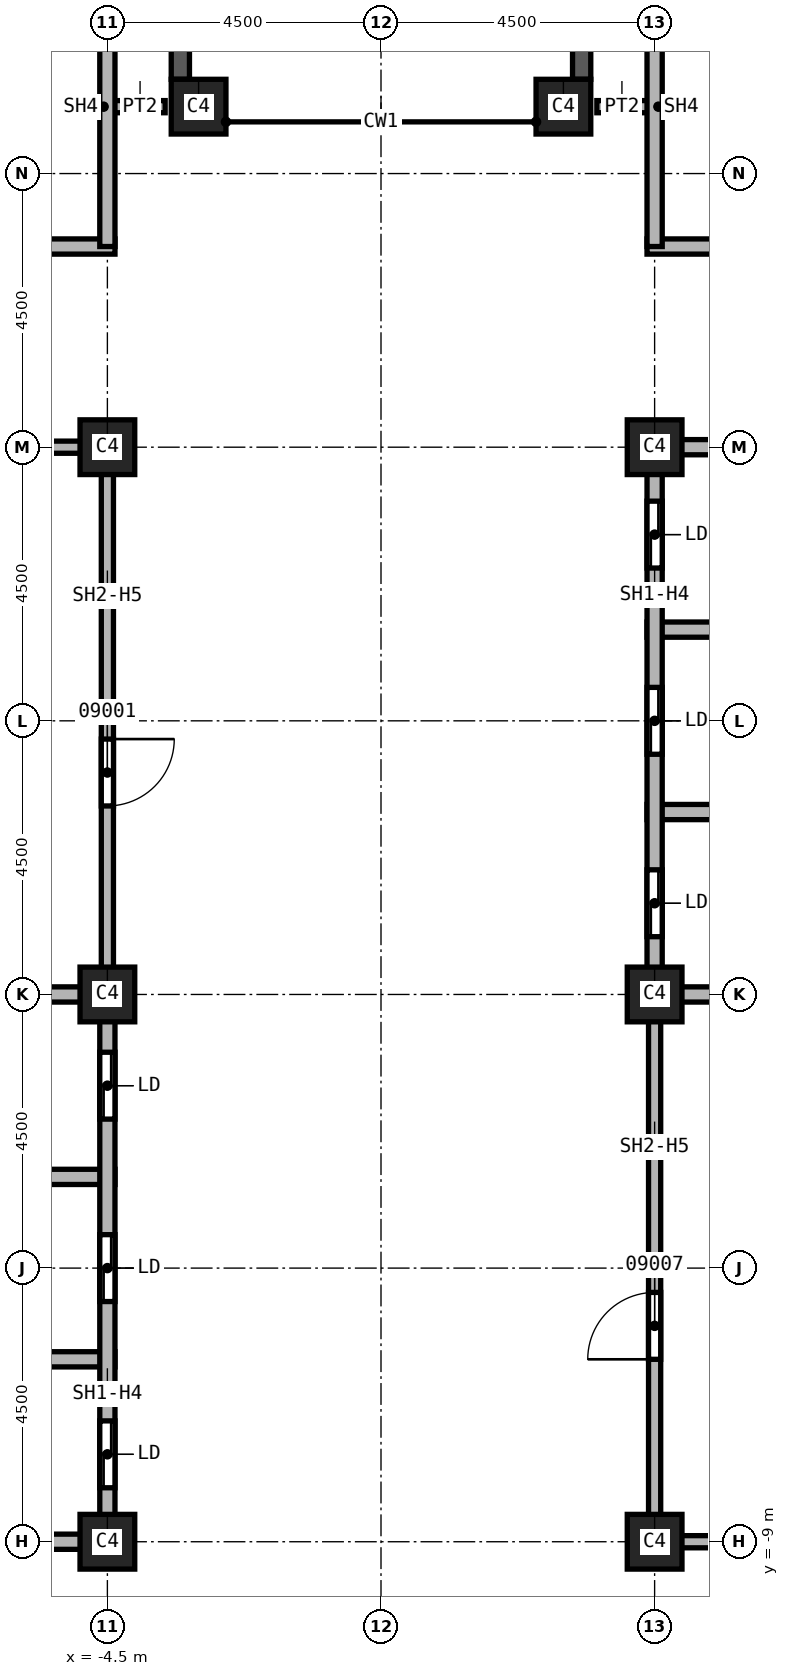
"""IFC4 building model, lengths in metres.
Left out: names, types, materials, properties, quantities, classifications, styles, units other than length and angle.
Written with IfcOpenShell. Run it as: python <this file> out.ifc"""

import sys

from ifc_helpers import new_model, si_unit, direction, frame, frame_2d, origin, origin_2d, place, context, subcontext, project, spatial, rectangle, extrude, element, fill, save


model = new_model("IFC4")
c1 = context("Model", 3, precision=1e-05, world=origin(), true_north=direction((0.0, 1.0)))
c2 = subcontext(c1, "Body", "Model", "MODEL_VIEW")
j1 = project(units=[si_unit("LENGTHUNIT", "METRE"), si_unit("PLANEANGLEUNIT", "RADIAN")], contexts=[c1])
p1 = place(None, origin())
s1 = spatial("IfcSite", under=j1, at=p1, CompositionType="ELEMENT")
p2 = place(p1, origin())
s2 = spatial("IfcBuilding", under=s1, at=p2, CompositionType="ELEMENT")
p3 = place(p2, frame((0.0, 0.0, 166.0)))
s3 = spatial("IfcBuildingStorey", under=s2, at=p3, CompositionType="ELEMENT", Elevation=166.0)
for number, where, z_axis, x_axis in (
    (1, (4.5, 0.0, 0.0), (0.0, 0.0, 1.0), (1.0, 0.0, 0.0)),
    (2, (4.5, 9.0, 0.0), (0.0, 0.0, 1.0), (1.0, 0.0, 0.0)),
    (3, (4.5, -9.0, 0.0), (0.0, 0.0, 1.0), (1.0, 0.0, 0.0)),
    (4, (-4.5, 0.0, 0.0), (0.0, 0.0, 1.0), (1.0, 0.0, 0.0)),
    (5, (-4.5, 9.0, 0.0), (0.0, 0.0, 1.0), (1.0, 0.0, 0.0)),
    (6, (-4.5, -9.0, 0.0), (0.0, 0.0, 1.0), (1.0, 0.0, 0.0)),
    (7, (3.0, 14.6, 0.0), (0.0, 0.0, 1.0), (1.0, 0.0, 0.0)),
    (8, (-3.0, 14.6, 0.0), (0.0, 0.0, 1.0), (1.0, 0.0, 0.0)),
):
    element("IfcColumn", number, at=place(p3, frame(where, z_axis=z_axis, x_axis=x_axis)), inside=s3, PredefinedType="COLUMN", context=c2, shape_type="SweptSolid", body=[
        extrude(rectangle(XDim=0.9, YDim=0.9, at=origin_2d()), origin(), (0.0, 0.0, 1.0), 3.7),
    ])
p4 = place(p3, frame((3.3, 23.05, 0.0), z_axis=(0.0, 0.0, 1.0), x_axis=(0.0, -1.0, 0.0)))
e9 = element("IfcWall", 9, at=p4, inside=s3, PredefinedType="SOLIDWALL", context=c2, shape_type="SweptSolid", body=[
    extrude(rectangle(XDim=8.0, YDim=0.3, at=frame_2d((4.0, 0.0))), origin(), (0.0, 0.0, 1.0), 3.1),
])
p5 = place(p4, frame((0.8, 0.0, 0.8)))
e10 = element("IfcOpeningElement", 10, at=p5, cuts=e9, PredefinedType="OPENING", context=c2, shape_type="SweptSolid", body=[
    extrude(rectangle(XDim=2.4, YDim=1.95, at=frame_2d((1.2, 0.975))), frame((0.0, 0.15, 0.0), z_axis=(0.0, -1.0, 0.0), x_axis=(1.0, 0.0, 0.0)), (0.0, 0.0, 1.0), 0.3),
])
p6 = place(p4, frame((4.8, 0.0, 0.8)))
e11 = element("IfcOpeningElement", 11, at=p6, cuts=e9, PredefinedType="OPENING", context=c2, shape_type="SweptSolid", body=[
    extrude(rectangle(XDim=2.4, YDim=1.95, at=frame_2d((1.2, 0.975))), frame((0.0, 0.15, 0.0), z_axis=(0.0, -1.0, 0.0), x_axis=(1.0, 0.0, 0.0)), (0.0, 0.0, 1.0), 0.3),
])
p7 = place(p3, frame((-3.3, 15.05, 0.0), z_axis=(0.0, 0.0, 1.0), x_axis=(0.0, 1.0, 0.0)))
e12 = element("IfcWall", 12, at=p7, inside=s3, PredefinedType="SOLIDWALL", context=c2, shape_type="SweptSolid", body=[
    extrude(rectangle(XDim=8.0, YDim=0.3, at=frame_2d((4.0, 0.0))), origin(), (0.0, 0.0, 1.0), 3.1),
])
p8 = place(p7, frame((0.8, 0.0, 0.8)))
e13 = element("IfcOpeningElement", 13, at=p8, cuts=e12, PredefinedType="OPENING", context=c2, shape_type="SweptSolid", body=[
    extrude(rectangle(XDim=2.4, YDim=1.95, at=frame_2d((1.2, 0.975))), frame((0.0, 0.15, 0.0), z_axis=(0.0, -1.0, 0.0), x_axis=(1.0, 0.0, 0.0)), (0.0, 0.0, 1.0), 0.3),
])
p9 = place(p7, frame((4.8, 0.0, 0.8)))
e14 = element("IfcOpeningElement", 14, at=p9, cuts=e12, PredefinedType="OPENING", context=c2, shape_type="SweptSolid", body=[
    extrude(rectangle(XDim=2.4, YDim=1.95, at=frame_2d((1.2, 0.975))), frame((0.0, 0.15, 0.0), z_axis=(0.0, -1.0, 0.0), x_axis=(1.0, 0.0, 0.0)), (0.0, 0.0, 1.0), 0.3),
])
for number, where, z_axis, x_axis in (
    (15, (-4.5, 14.6, 0.0), (0.0, 0.0, 1.0), (1.0, 0.0, 0.0)),
    (16, (3.55, 14.6, 0.0), (0.0, 0.0, 1.0), (1.0, 0.0, 0.0)),
):
    element("IfcWall", number, at=place(p3, frame(where, z_axis=z_axis, x_axis=x_axis)), inside=s3, PredefinedType="PARTITIONING", context=c2, shape_type="SweptSolid", body=[
        extrude(rectangle(XDim=0.95, YDim=0.2, at=frame_2d((0.475, 0.0))), origin(), (0.0, 0.0, 1.0), 3.7),
    ])
p10 = place(p3, frame((-7.5, 9.0, 0.0), z_axis=(0.0, 0.0, 1.0), x_axis=(1.0, 0.0, 0.0)))
e17 = element("IfcWall", 17, at=p10, inside=s3, PredefinedType="SOLIDWALL", context=c2, shape_type="SweptSolid", body=[
    extrude(rectangle(XDim=3.0, YDim=0.2, at=frame_2d((1.5, 0.0))), origin(), (0.0, 0.0, 1.0), 2.938),
])
p11 = place(p3, frame((-4.5, 9.1, 0.0), z_axis=(0.0, 0.0, 1.0), x_axis=(0.0, -1.0, 0.0)))
e18 = element("IfcWall", 18, at=p11, inside=s3, PredefinedType="SOLIDWALL", context=c2, shape_type="SweptSolid", body=[
    extrude(rectangle(XDim=9.1, YDim=0.2, at=frame_2d((4.55, 0.0))), origin(), (0.0, 0.0, 1.0), 2.938),
])
p12 = place(p11, frame((4.9, 0.0, 0.0)))
e19 = element("IfcOpeningElement", 19, at=p12, cuts=e18, PredefinedType="OPENING", context=c2, shape_type="SweptSolid", body=[
    extrude(rectangle(XDim=1.1, YDim=2.1, at=frame_2d((0.55, 1.05))), frame((0.0, 0.1, 0.0), z_axis=(0.0, -1.0, 0.0), x_axis=(1.0, 0.0, 0.0)), (0.0, 0.0, 1.0), 0.2),
])
p13 = place(p3, frame((4.5, -9.1, 0.0), z_axis=(0.0, 0.0, 1.0), x_axis=(0.0, 1.0, 0.0)))
e20 = element("IfcWall", 20, at=p13, inside=s3, PredefinedType="SOLIDWALL", context=c2, shape_type="SweptSolid", body=[
    extrude(rectangle(XDim=9.1, YDim=0.2, at=frame_2d((4.55, 0.0))), origin(), (0.0, 0.0, 1.0), 2.938),
])
p14 = place(p13, frame((3.1, 0.0, 0.0)))
e21 = element("IfcOpeningElement", 21, at=p14, cuts=e20, PredefinedType="OPENING", context=c2, shape_type="SweptSolid", body=[
    extrude(rectangle(XDim=1.1, YDim=2.1, at=frame_2d((0.55, 1.05))), frame((0.0, 0.1, 0.0), z_axis=(0.0, -1.0, 0.0), x_axis=(1.0, 0.0, 0.0)), (0.0, 0.0, 1.0), 0.2),
])
p15 = place(p3, frame((7.5, -9.0, 0.0), z_axis=(0.0, 0.0, 1.0), x_axis=(-1.0, 0.0, 0.0)))
e22 = element("IfcWall", 22, at=p15, inside=s3, PredefinedType="SOLIDWALL", context=c2, shape_type="SweptSolid", body=[
    extrude(rectangle(XDim=3.0, YDim=0.2, at=frame_2d((1.5, 0.0))), origin(), (0.0, 0.0, 1.0), 2.938),
])
p16 = place(p3, frame((-13.625, -3.0, 0.0), z_axis=(0.0, 0.0, 1.0), x_axis=(1.0, 0.0, 0.0)))
e23 = element("IfcWall", 23, at=p16, inside=s3, PredefinedType="SOLIDWALL", context=c2, shape_type="SweptSolid", body=[
    extrude(rectangle(XDim=9.25, YDim=0.25, at=frame_2d((4.625, 0.0))), origin(), (0.0, 0.0, 1.0), 3.7),
])
p17 = place(p16, frame((3.25, 0.0, 0.0)))
e24 = element("IfcOpeningElement", 24, at=p17, cuts=e23, PredefinedType="OPENING", context=c2, shape_type="SweptSolid", body=[
    extrude(rectangle(XDim=1.1, YDim=2.1, at=frame_2d((0.55, 1.05))), frame((0.0, 0.125, 0.0), z_axis=(0.0, -1.0, 0.0), x_axis=(1.0, 0.0, 0.0)), (0.0, 0.0, 1.0), 0.25),
])
for number, where, z_axis, x_axis in (
    (25, (-7.625, -6.0, 0.0), (0.0, 0.0, 1.0), (1.0, 0.0, 0.0)),
    (26, (-7.625, 0.0, 0.0), (0.0, 0.0, 1.0), (1.0, 0.0, 0.0)),
):
    element("IfcWall", number, at=place(p3, frame(where, z_axis=z_axis, x_axis=x_axis)), inside=s3, PredefinedType="SOLIDWALL", context=c2, shape_type="SweptSolid", body=[
        extrude(rectangle(XDim=3.25, YDim=0.25, at=frame_2d((1.625, 0.0))), origin(), (0.0, 0.0, 1.0), 3.7),
    ])
p18 = place(p3, frame((-4.5, -9.0, 0.0), z_axis=(0.0, 0.0, 1.0), x_axis=(-1.0, 0.0, 0.0)))
e27 = element("IfcWall", 27, at=p18, inside=s3, PredefinedType="SOLIDWALL", context=c2, shape_type="SweptSolid", body=[
    extrude(rectangle(XDim=3.0, YDim=0.25, at=frame_2d((1.5, 0.0))), origin(), (0.0, 0.0, 1.0), 2.938),
])
p19 = place(p3, frame((-4.5, 0.0, 0.0), z_axis=(0.0, 0.0, 1.0), x_axis=(0.0, -1.0, 0.0)))
e28 = element("IfcWall", 28, at=p19, inside=s3, PredefinedType="SOLIDWALL", context=c2, shape_type="SweptSolid", body=[
    extrude(rectangle(XDim=9.125, YDim=0.25, at=frame_2d((4.562, 0.0))), origin(), (0.0, 0.0, 1.0), 2.938),
])
p20 = place(p19, frame((7.012, 0.0, 0.0)))
e29 = element("IfcOpeningElement", 29, at=p20, cuts=e28, PredefinedType="OPENING", context=c2, shape_type="SweptSolid", body=[
    extrude(rectangle(XDim=1.1, YDim=2.1, at=frame_2d((0.55, 1.05))), frame((0.0, 0.125, 0.0), z_axis=(0.0, -1.0, 0.0), x_axis=(1.0, 0.0, 0.0)), (0.0, 0.0, 1.0), 0.25),
])
p21 = place(p19, frame((3.95, 0.0, 0.0)))
e30 = element("IfcOpeningElement", 30, at=p21, cuts=e28, PredefinedType="OPENING", context=c2, shape_type="SweptSolid", body=[
    extrude(rectangle(XDim=1.1, YDim=2.1, at=frame_2d((0.55, 1.05))), frame((0.0, 0.125, 0.0), z_axis=(0.0, -1.0, 0.0), x_axis=(1.0, 0.0, 0.0)), (0.0, 0.0, 1.0), 0.25),
])
p22 = place(p19, frame((0.95, 0.0, 0.0)))
e31 = element("IfcOpeningElement", 31, at=p22, cuts=e28, PredefinedType="OPENING", context=c2, shape_type="SweptSolid", body=[
    extrude(rectangle(XDim=1.1, YDim=2.1, at=frame_2d((0.55, 1.05))), frame((0.0, 0.125, 0.0), z_axis=(0.0, -1.0, 0.0), x_axis=(1.0, 0.0, 0.0)), (0.0, 0.0, 1.0), 0.25),
])
p23 = place(p3, frame((4.375, 0.0, 0.0), z_axis=(0.0, 0.0, 1.0), x_axis=(1.0, 0.0, 0.0)))
e32 = element("IfcWall", 32, at=p23, inside=s3, PredefinedType="SOLIDWALL", context=c2, shape_type="SweptSolid", body=[
    extrude(rectangle(XDim=3.25, YDim=0.25, at=frame_2d((1.625, 0.0))), origin(), (0.0, 0.0, 1.0), 3.7),
])
p24 = place(p3, frame((4.375, 3.0, 0.0), z_axis=(0.0, 0.0, 1.0), x_axis=(1.0, 0.0, 0.0)))
e33 = element("IfcWall", 33, at=p24, inside=s3, PredefinedType="SOLIDWALL", context=c2, shape_type="SweptSolid", body=[
    extrude(rectangle(XDim=9.25, YDim=0.25, at=frame_2d((4.625, 0.0))), origin(), (0.0, 0.0, 1.0), 3.7),
])
p25 = place(p24, frame((4.875, 0.0, 0.0)))
e34 = element("IfcOpeningElement", 34, at=p25, cuts=e33, PredefinedType="OPENING", context=c2, shape_type="SweptSolid", body=[
    extrude(rectangle(XDim=1.1, YDim=2.1, at=frame_2d((0.55, 1.05))), frame((0.0, 0.125, 0.0), z_axis=(0.0, -1.0, 0.0), x_axis=(1.0, 0.0, 0.0)), (0.0, 0.0, 1.0), 0.25),
])
p26 = place(p3, frame((4.375, 6.0, 0.0), z_axis=(0.0, 0.0, 1.0), x_axis=(1.0, 0.0, 0.0)))
e35 = element("IfcWall", 35, at=p26, inside=s3, PredefinedType="SOLIDWALL", context=c2, shape_type="SweptSolid", body=[
    extrude(rectangle(XDim=3.25, YDim=0.25, at=frame_2d((1.625, 0.0))), origin(), (0.0, 0.0, 1.0), 3.7),
])
p27 = place(p3, frame((4.5, 0.0, 0.0), z_axis=(0.0, 0.0, 1.0), x_axis=(0.0, 1.0, 0.0)))
e36 = element("IfcWall", 36, at=p27, inside=s3, PredefinedType="SOLIDWALL", context=c2, shape_type="SweptSolid", body=[
    extrude(rectangle(XDim=9.125, YDim=0.25, at=frame_2d((4.562, 0.0))), origin(), (0.0, 0.0, 1.0), 2.938),
])
p28 = place(p27, frame((0.95, 0.0, 0.0)))
e37 = element("IfcOpeningElement", 37, at=p28, cuts=e36, PredefinedType="OPENING", context=c2, shape_type="SweptSolid", body=[
    extrude(rectangle(XDim=1.1, YDim=2.1, at=frame_2d((0.55, 1.05))), frame((0.0, 0.125, 0.0), z_axis=(0.0, -1.0, 0.0), x_axis=(1.0, 0.0, 0.0)), (0.0, 0.0, 1.0), 0.25),
])
p29 = place(p27, frame((3.95, 0.0, 0.0)))
e38 = element("IfcOpeningElement", 38, at=p29, cuts=e36, PredefinedType="OPENING", context=c2, shape_type="SweptSolid", body=[
    extrude(rectangle(XDim=1.1, YDim=2.1, at=frame_2d((0.55, 1.05))), frame((0.0, 0.125, 0.0), z_axis=(0.0, -1.0, 0.0), x_axis=(1.0, 0.0, 0.0)), (0.0, 0.0, 1.0), 0.25),
])
p30 = place(p27, frame((7.012, 0.0, 0.0)))
e39 = element("IfcOpeningElement", 39, at=p30, cuts=e36, PredefinedType="OPENING", context=c2, shape_type="SweptSolid", body=[
    extrude(rectangle(XDim=1.1, YDim=2.1, at=frame_2d((0.55, 1.05))), frame((0.0, 0.125, 0.0), z_axis=(0.0, -1.0, 0.0), x_axis=(1.0, 0.0, 0.0)), (0.0, 0.0, 1.0), 0.25),
])
p31 = place(p3, frame((4.5, 9.0, 0.0), z_axis=(0.0, 0.0, 1.0), x_axis=(1.0, 0.0, 0.0)))
e40 = element("IfcWall", 40, at=p31, inside=s3, PredefinedType="SOLIDWALL", context=c2, shape_type="SweptSolid", body=[
    extrude(rectangle(XDim=3.0, YDim=0.25, at=frame_2d((1.5, 0.0))), origin(), (0.0, 0.0, 1.0), 2.938),
])
p32 = place(p3, frame((-13.5, 12.3, 0.0), z_axis=(0.0, 0.0, 1.0), x_axis=(1.0, 0.0, 0.0)))
e41 = element("IfcWall", 41, at=p32, inside=s3, PredefinedType="SOLIDWALL", context=c2, shape_type="SweptSolid", body=[
    extrude(rectangle(XDim=9.125, YDim=0.25, at=frame_2d((4.562, 0.0))), origin(), (0.0, 0.0, 1.0), 3.7),
])
p33 = place(p32, frame((0.6, 0.0, 0.0)))
e42 = element("IfcOpeningElement", 42, at=p33, cuts=e41, PredefinedType="OPENING", context=c2, shape_type="SweptSolid", body=[
    extrude(rectangle(XDim=1.2, YDim=2.1, at=frame_2d((0.6, 1.05))), frame((0.0, 0.125, 0.0), z_axis=(0.0, -1.0, 0.0), x_axis=(1.0, 0.0, 0.0)), (0.0, 0.0, 1.0), 0.25),
])
p34 = place(p3, frame((-4.5, 16.8, 0.0), z_axis=(0.0, 0.0, 1.0), x_axis=(0.0, -1.0, 0.0)))
e43 = element("IfcWall", 43, at=p34, inside=s3, PredefinedType="SOLIDWALL", context=c2, shape_type="SweptSolid", body=[
    extrude(rectangle(XDim=4.5, YDim=0.25, at=frame_2d((2.25, 0.0))), origin(), (0.0, 0.0, 1.0), 3.7),
])
p35 = place(p3, frame((4.375, 12.3, 0.0), z_axis=(0.0, 0.0, 1.0), x_axis=(1.0, 0.0, 0.0)))
e44 = element("IfcWall", 44, at=p35, inside=s3, PredefinedType="SOLIDWALL", context=c2, shape_type="SweptSolid", body=[
    extrude(rectangle(XDim=9.125, YDim=0.25, at=frame_2d((4.562, 0.0))), origin(), (0.0, 0.0, 1.0), 3.7),
])
p36 = place(p35, frame((7.2, 0.0, 0.0)))
e45 = element("IfcOpeningElement", 45, at=p36, cuts=e44, PredefinedType="OPENING", context=c2, shape_type="SweptSolid", body=[
    extrude(rectangle(XDim=1.2, YDim=2.1, at=frame_2d((0.6, 1.05))), frame((0.0, 0.125, 0.0), z_axis=(0.0, -1.0, 0.0), x_axis=(1.0, 0.0, 0.0)), (0.0, 0.0, 1.0), 0.25),
])
p37 = place(p3, frame((4.5, 12.3, 0.0), z_axis=(0.0, 0.0, 1.0), x_axis=(0.0, 1.0, 0.0)))
e46 = element("IfcWall", 46, at=p37, inside=s3, PredefinedType="SOLIDWALL", context=c2, shape_type="SweptSolid", body=[
    extrude(rectangle(XDim=4.5, YDim=0.25, at=frame_2d((2.25, 0.0))), origin(), (0.0, 0.0, 1.0), 3.7),
])
p38 = place(p12, origin())
e47 = element("IfcDoor", 47, at=p38, inside=s3, OperationType="SINGLE_SWING_RIGHT", PredefinedType="DOOR", context=c2, shape_type="SweptSolid", body=[
    extrude(rectangle(XDim=1.1, YDim=2.1, at=frame_2d((0.55, 1.05))), frame((0.0, 0.025, 0.0), z_axis=(0.0, -1.0, 0.0), x_axis=(1.0, 0.0, 0.0)), (0.0, 0.0, 1.0), 0.05),
])
fill(e19, e47)
p39 = place(p14, origin())
e48 = element("IfcDoor", 48, at=p39, inside=s3, OperationType="SINGLE_SWING_RIGHT", PredefinedType="DOOR", context=c2, shape_type="SweptSolid", body=[
    extrude(rectangle(XDim=1.1, YDim=2.1, at=frame_2d((0.55, 1.05))), frame((0.0, 0.025, 0.0), z_axis=(0.0, -1.0, 0.0), x_axis=(1.0, 0.0, 0.0)), (0.0, 0.0, 1.0), 0.05),
])
fill(e21, e48)
p40 = place(p20, origin())
e49 = element("IfcDoor", 49, at=p40, inside=s3, OperationType="SLIDING_TO_LEFT", PredefinedType="DOOR", context=c2, shape_type="SweptSolid", body=[
    extrude(rectangle(XDim=1.1, YDim=2.1, at=frame_2d((0.55, 1.05))), frame((0.0, 0.025, 0.0), z_axis=(0.0, -1.0, 0.0), x_axis=(1.0, 0.0, 0.0)), (0.0, 0.0, 1.0), 0.05),
])
fill(e29, e49)
p41 = place(p21, origin())
e50 = element("IfcDoor", 50, at=p41, inside=s3, OperationType="SLIDING_TO_LEFT", PredefinedType="DOOR", context=c2, shape_type="SweptSolid", body=[
    extrude(rectangle(XDim=1.1, YDim=2.1, at=frame_2d((0.55, 1.05))), frame((0.0, 0.025, 0.0), z_axis=(0.0, -1.0, 0.0), x_axis=(1.0, 0.0, 0.0)), (0.0, 0.0, 1.0), 0.05),
])
fill(e30, e50)
p42 = place(p22, origin())
e51 = element("IfcDoor", 51, at=p42, inside=s3, OperationType="SLIDING_TO_LEFT", PredefinedType="DOOR", context=c2, shape_type="SweptSolid", body=[
    extrude(rectangle(XDim=1.1, YDim=2.1, at=frame_2d((0.55, 1.05))), frame((0.0, 0.025, 0.0), z_axis=(0.0, -1.0, 0.0), x_axis=(1.0, 0.0, 0.0)), (0.0, 0.0, 1.0), 0.05),
])
fill(e31, e51)
p43 = place(p28, origin())
e52 = element("IfcDoor", 52, at=p43, inside=s3, OperationType="SLIDING_TO_LEFT", PredefinedType="DOOR", context=c2, shape_type="SweptSolid", body=[
    extrude(rectangle(XDim=1.1, YDim=2.1, at=frame_2d((0.55, 1.05))), frame((0.0, 0.025, 0.0), z_axis=(0.0, -1.0, 0.0), x_axis=(1.0, 0.0, 0.0)), (0.0, 0.0, 1.0), 0.05),
])
fill(e37, e52)
p44 = place(p29, origin())
e53 = element("IfcDoor", 53, at=p44, inside=s3, OperationType="SLIDING_TO_LEFT", PredefinedType="DOOR", context=c2, shape_type="SweptSolid", body=[
    extrude(rectangle(XDim=1.1, YDim=2.1, at=frame_2d((0.55, 1.05))), frame((0.0, 0.025, 0.0), z_axis=(0.0, -1.0, 0.0), x_axis=(1.0, 0.0, 0.0)), (0.0, 0.0, 1.0), 0.05),
])
fill(e38, e53)
p45 = place(p30, origin())
e54 = element("IfcDoor", 54, at=p45, inside=s3, OperationType="SLIDING_TO_LEFT", PredefinedType="DOOR", context=c2, shape_type="SweptSolid", body=[
    extrude(rectangle(XDim=1.1, YDim=2.1, at=frame_2d((0.55, 1.05))), frame((0.0, 0.025, 0.0), z_axis=(0.0, -1.0, 0.0), x_axis=(1.0, 0.0, 0.0)), (0.0, 0.0, 1.0), 0.05),
])
fill(e39, e54)
save(model, sys.argv[1])
